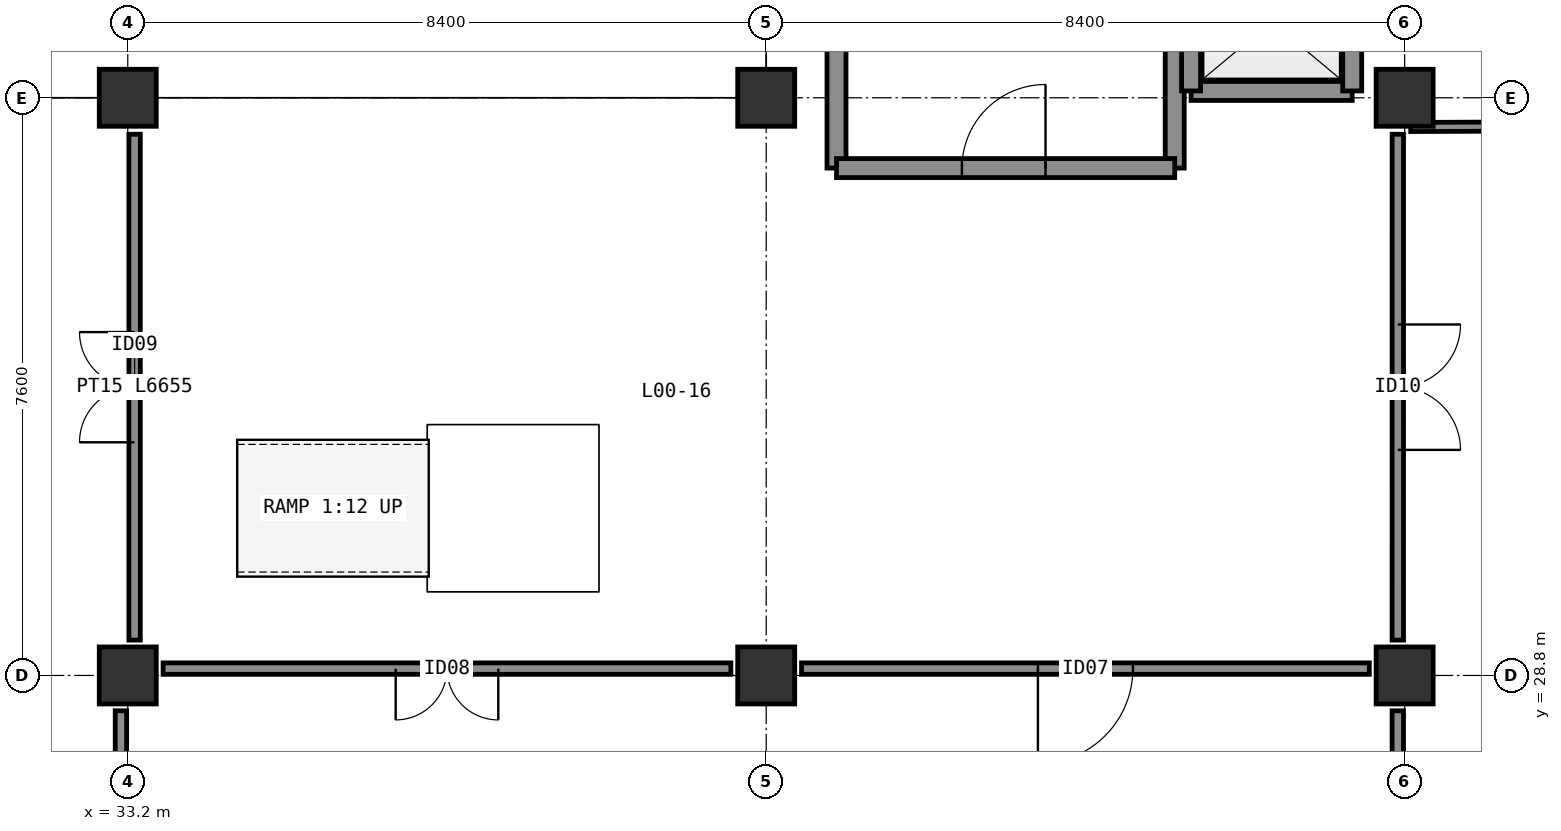
"""IFC4 building model, lengths in metres.
Left out: names, types, materials, properties, quantities, classifications, styles, units other than length and angle.
Written with IfcOpenShell. Run it as: python <this file> out.ifc"""

import sys

from ifc_helpers import new_model, si_unit, direction, frame, frame_2d, origin, origin_2d, place, context, subcontext, project, spatial, rectangle, extrude, element, fill, save


model = new_model("IFC4")
c1 = context("Model", 3, precision=1e-05, world=origin(), true_north=direction((0.0, 1.0)))
c2 = subcontext(c1, "Body", "Model", "MODEL_VIEW")
j1 = project(units=[si_unit("LENGTHUNIT", "METRE"), si_unit("PLANEANGLEUNIT", "RADIAN")], contexts=[c1])
p1 = place(None, origin())
s1 = spatial("IfcSite", under=j1, at=p1, CompositionType="ELEMENT")
p2 = place(p1, origin())
s2 = spatial("IfcBuilding", under=s1, at=p2, CompositionType="ELEMENT")
p3 = place(p2, origin())
s3 = spatial("IfcBuildingStorey", under=s2, at=p3, CompositionType="ELEMENT", Elevation=0.0)
for number, where, z_axis, x_axis in (
    (1, (33.2, 28.8, 0.0), (0.0, 0.0, 1.0), (1.0, 0.0, 0.0)),
    (2, (41.6, 28.8, 0.0), (0.0, 0.0, 1.0), (1.0, 0.0, 0.0)),
    (3, (50.0, 28.8, 0.0), (0.0, 0.0, 1.0), (1.0, 0.0, 0.0)),
    (4, (33.2, 36.4, 0.0), (0.0, 0.0, 1.0), (1.0, 0.0, 0.0)),
    (5, (41.6, 36.4, 0.0), (0.0, 0.0, 1.0), (1.0, 0.0, 0.0)),
    (6, (50.0, 36.4, 0.0), (0.0, 0.0, 1.0), (1.0, 0.0, 0.0)),
):
    element("IfcColumn", number, at=place(p3, frame(where, z_axis=z_axis, x_axis=x_axis)), inside=s3, PredefinedType="COLUMN", context=c2, shape_type="SweptSolid", body=[
        extrude(rectangle(XDim=0.75, YDim=0.75, at=origin_2d()), origin(), (0.0, 0.0, 1.0), 4.8),
    ])
for number, where, z_axis, x_axis in (
    (7, (42.525, 35.475, 0.0), (0.0, 0.0, 1.0), (0.0, 1.0, 0.0)),
    (8, (46.975, 35.475, 0.0), (0.0, 0.0, 1.0), (0.0, 1.0, 0.0)),
):
    element("IfcWall", number, at=place(p3, frame(where, z_axis=z_axis, x_axis=x_axis)), inside=s3, PredefinedType="SHEAR", context=c2, shape_type="SweptSolid", body=[
        extrude(rectangle(XDim=8.1, YDim=0.25, at=frame_2d((4.05, 0.0))), origin(), (0.0, 0.0, 1.0), 4.52),
    ])
p4 = place(p3, frame((42.525, 35.475, 0.0), z_axis=(0.0, 0.0, 1.0), x_axis=(1.0, 0.0, 0.0)))
e9 = element("IfcWall", 9, at=p4, inside=s3, PredefinedType="SHEAR", context=c2, shape_type="SweptSolid", body=[
    extrude(rectangle(XDim=4.45, YDim=0.25, at=frame_2d((2.225, 0.0))), origin(), (0.0, 0.0, 1.0), 4.52),
])
p5 = place(p4, frame((1.65, 0.0, 0.0)))
e10 = element("IfcOpeningElement", 10, at=p5, cuts=e9, PredefinedType="OPENING", context=c2, shape_type="SweptSolid", body=[
    extrude(rectangle(XDim=1.1, YDim=2.1, at=frame_2d((0.55, 1.05))), frame((0.0, 0.135, 0.0), z_axis=(0.0, -1.0, 0.0), x_axis=(1.0, 0.0, 0.0)), (0.0, 0.0, 1.0), 0.27),
])
p6 = place(p3, frame((47.19, 36.49, 0.0), z_axis=(0.0, 0.0, 1.0), x_axis=(1.0, 0.0, 0.0)))
e11 = element("IfcWall", 11, at=p6, inside=s3, PredefinedType="SHEAR", context=c2, shape_type="SweptSolid", body=[
    extrude(rectangle(XDim=2.12, YDim=0.25, at=frame_2d((1.06, 0.0))), origin(), (0.0, 0.0, 1.0), 4.52),
])
for number, where, z_axis, x_axis in (
    (12, (47.19, 36.49, 0.0), (0.0, 0.0, 1.0), (0.0, 1.0, 0.0)),
    (13, (49.31, 36.49, 0.0), (0.0, 0.0, 1.0), (0.0, 1.0, 0.0)),
):
    element("IfcWall", number, at=place(p3, frame(where, z_axis=z_axis, x_axis=x_axis)), inside=s3, PredefinedType="SHEAR", context=c2, shape_type="SweptSolid", body=[
        extrude(rectangle(XDim=1.82, YDim=0.25, at=frame_2d((0.91, 0.0))), origin(), (0.0, 0.0, 1.0), 4.52),
    ])
p7 = place(p3, frame((66.26, 36.09, 0.0), z_axis=(0.0, 0.0, 1.0), x_axis=(-0.999989479484, -0.004587038489, 0.0)))
e14 = element("IfcWall", 14, at=p7, inside=s3, PredefinedType="PARTITIONING", context=c2, shape_type="SweptSolid", body=[
    extrude(rectangle(XDim=16.18, YDim=0.12, at=frame_2d((8.09, 0.0))), origin(), (0.0, 0.0, 1.0), 4.5),
])
p8 = place(p7, frame((8.815, 0.0, 0.0)))
e15 = element("IfcOpeningElement", 15, at=p8, cuts=e14, PredefinedType="OPENING", context=c2, shape_type="SweptSolid", body=[
    extrude(rectangle(XDim=1.15, YDim=2.12, at=frame_2d((0.575, 1.06))), frame((0.0, 0.07, 0.0), z_axis=(0.0, -1.0, 0.0), x_axis=(1.0, 0.0, 0.0)), (0.0, 0.0, 1.0), 0.14),
])
p9 = place(p3, frame((33.29, 29.265, 0.0), z_axis=(0.0, 0.0, 1.0), x_axis=(0.0, 1.0, 0.0)))
e16 = element("IfcWall", 16, at=p9, inside=s3, PredefinedType="PARTITIONING", context=c2, shape_type="SweptSolid", body=[
    extrude(rectangle(XDim=6.655, YDim=0.15, at=frame_2d((3.328, 0.0))), origin(), (0.0, 0.0, 1.0), 4.5),
])
p10 = place(p9, frame((2.603, 0.0, 0.0)))
e17 = element("IfcOpeningElement", 17, at=p10, cuts=e16, PredefinedType="OPENING", context=c2, shape_type="SweptSolid", body=[
    extrude(rectangle(XDim=1.45, YDim=2.18, at=frame_2d((0.725, 1.09))), frame((0.0, 0.085, 0.0), z_axis=(0.0, -1.0, 0.0), x_axis=(1.0, 0.0, 0.0)), (0.0, 0.0, 1.0), 0.17),
])
p11 = place(p3, frame((49.91, 35.92, 0.0), z_axis=(0.0, 0.0, 1.0), x_axis=(-7.3370263e-05, -0.999999997308, 0.0)))
e18 = element("IfcWall", 18, at=p11, inside=s3, PredefinedType="PARTITIONING", context=c2, shape_type="SweptSolid", body=[
    extrude(rectangle(XDim=6.655, YDim=0.15, at=frame_2d((3.328, 0.0))), origin(), (0.0, 0.0, 1.0), 3.81),
])
p12 = place(p11, frame((2.502, 0.0, 0.0)))
e19 = element("IfcOpeningElement", 19, at=p12, cuts=e18, PredefinedType="OPENING", context=c2, shape_type="SweptSolid", body=[
    extrude(rectangle(XDim=1.65, YDim=2.18, at=frame_2d((0.825, 1.09))), frame((0.0, 0.085, 0.0), z_axis=(0.0, -1.0, 0.0), x_axis=(1.0, 0.0, 0.0)), (0.0, 0.0, 1.0), 0.17),
])
p13 = place(p3, frame((33.11, 28.335, 0.0), z_axis=(0.0, 0.0, 1.0), x_axis=(0.0, -1.0, 0.0)))
e20 = element("IfcWall", 20, at=p13, inside=s3, PredefinedType="PARTITIONING", context=c2, shape_type="SweptSolid", body=[
    extrude(rectangle(XDim=6.67, YDim=0.15, at=frame_2d((3.335, 0.0))), origin(), (0.0, 0.0, 1.0), 3.81),
])
p14 = place(p13, frame((2.41, 0.0, 0.0)))
e21 = element("IfcOpeningElement", 21, at=p14, cuts=e20, PredefinedType="OPENING", context=c2, shape_type="SweptSolid", body=[
    extrude(rectangle(XDim=1.85, YDim=2.22, at=frame_2d((0.925, 1.11))), frame((0.0, 0.085, 0.0), z_axis=(0.0, -1.0, 0.0), x_axis=(1.0, 0.0, 0.0)), (0.0, 0.0, 1.0), 0.17),
])
p15 = place(p3, frame((49.91, 28.335, 0.0), z_axis=(0.0, 0.0, 1.0), x_axis=(0.0, -1.0, 0.0)))
e22 = element("IfcWall", 22, at=p15, inside=s3, PredefinedType="PARTITIONING", context=c2, shape_type="SweptSolid", body=[
    extrude(rectangle(XDim=6.67, YDim=0.15, at=frame_2d((3.335, 0.0))), origin(), (0.0, 0.0, 1.0), 4.5),
])
p16 = place(p15, frame((2.845, 0.0, 0.0)))
e23 = element("IfcOpeningElement", 23, at=p16, cuts=e22, PredefinedType="OPENING", context=c2, shape_type="SweptSolid", body=[
    extrude(rectangle(XDim=0.98, YDim=2.08, at=frame_2d((0.49, 1.04))), frame((0.0, 0.085, 0.0), z_axis=(0.0, -1.0, 0.0), x_axis=(1.0, 0.0, 0.0)), (0.0, 0.0, 1.0), 0.17),
])
p17 = place(p3, frame((49.535, 28.89, 0.0), z_axis=(0.0, 0.0, 1.0), x_axis=(-1.0, 0.0, 0.0)))
e24 = element("IfcWall", 24, at=p17, inside=s3, PredefinedType="PARTITIONING", context=c2, shape_type="SweptSolid", body=[
    extrude(rectangle(XDim=7.47, YDim=0.15, at=frame_2d((3.735, 0.0))), origin(), (0.0, 0.0, 1.0), 3.81),
])
p18 = place(p17, frame((3.11, 0.0, 0.0)))
e25 = element("IfcOpeningElement", 25, at=p18, cuts=e24, PredefinedType="OPENING", context=c2, shape_type="SweptSolid", body=[
    extrude(rectangle(XDim=1.25, YDim=2.12, at=frame_2d((0.625, 1.06))), frame((0.0, 0.085, 0.0), z_axis=(0.0, -1.0, 0.0), x_axis=(1.0, 0.0, 0.0)), (0.0, 0.0, 1.0), 0.17),
])
p19 = place(p3, frame((41.135, 28.89, 0.0), z_axis=(0.0, 0.0, 1.0), x_axis=(-1.0, 0.0, 0.0)))
e26 = element("IfcWall", 26, at=p19, inside=s3, PredefinedType="PARTITIONING", context=c2, shape_type="SweptSolid", body=[
    extrude(rectangle(XDim=7.47, YDim=0.15, at=frame_2d((3.735, 0.0))), origin(), (0.0, 0.0, 1.0), 4.047),
])
p20 = place(p19, frame((3.06, 0.0, 0.0)))
e27 = element("IfcOpeningElement", 27, at=p20, cuts=e26, PredefinedType="OPENING", context=c2, shape_type="SweptSolid", body=[
    extrude(rectangle(XDim=1.35, YDim=2.18, at=frame_2d((0.675, 1.09))), frame((0.0, 0.085, 0.0), z_axis=(0.0, -1.0, 0.0), x_axis=(1.0, 0.0, 0.0)), (0.0, 0.0, 1.0), 0.17),
])
p21 = place(p5, frame((1.1, 0.0, 0.0), z_axis=(0.0, 0.0, 1.0), x_axis=(-1.0, 0.0, 0.0)))
e28 = element("IfcDoor", 28, at=p21, inside=s3, OperationType="SINGLE_SWING_RIGHT", PredefinedType="DOOR", context=c2, shape_type="SweptSolid", body=[
    extrude(rectangle(XDim=1.1, YDim=2.1, at=frame_2d((0.55, 1.05))), frame((0.0, 0.025, 0.0), z_axis=(0.0, -1.0, 0.0), x_axis=(1.0, 0.0, 0.0)), (0.0, 0.0, 1.0), 0.05),
])
fill(e10, e28)
p22 = place(p10, origin())
e29 = element("IfcDoor", 29, at=p22, inside=s3, OperationType="DOUBLE_DOOR_SINGLE_SWING", PredefinedType="DOOR", context=c2, shape_type="SweptSolid", body=[
    extrude(rectangle(XDim=1.45, YDim=2.18, at=frame_2d((0.725, 1.09))), frame((0.0, 0.025, 0.0), z_axis=(0.0, -1.0, 0.0), x_axis=(1.0, 0.0, 0.0)), (0.0, 0.0, 1.0), 0.05),
])
fill(e17, e29)
p23 = place(p12, origin())
e30 = element("IfcDoor", 30, at=p23, inside=s3, OperationType="DOUBLE_DOOR_SINGLE_SWING", PredefinedType="DOOR", context=c2, shape_type="SweptSolid", body=[
    extrude(rectangle(XDim=1.65, YDim=2.18, at=frame_2d((0.825, 1.09))), frame((0.0, 0.025, 0.0), z_axis=(0.0, -1.0, 0.0), x_axis=(1.0, 0.0, 0.0)), (0.0, 0.0, 1.0), 0.05),
])
fill(e19, e30)
p24 = place(p18, origin())
e31 = element("IfcDoor", 31, at=p24, inside=s3, OperationType="SINGLE_SWING_RIGHT", PredefinedType="DOOR", context=c2, shape_type="SweptSolid", body=[
    extrude(rectangle(XDim=1.25, YDim=2.12, at=frame_2d((0.625, 1.06))), frame((0.0, 0.025, 0.0), z_axis=(0.0, -1.0, 0.0), x_axis=(1.0, 0.0, 0.0)), (0.0, 0.0, 1.0), 0.05),
])
fill(e25, e31)
p25 = place(p20, origin())
e32 = element("IfcDoor", 32, at=p25, inside=s3, OperationType="DOUBLE_DOOR_SINGLE_SWING", PredefinedType="DOOR", context=c2, shape_type="SweptSolid", body=[
    extrude(rectangle(XDim=1.35, YDim=2.18, at=frame_2d((0.675, 1.09))), frame((0.0, 0.025, 0.0), z_axis=(0.0, -1.0, 0.0), x_axis=(1.0, 0.0, 0.0)), (0.0, 0.0, 1.0), 0.05),
])
fill(e27, e32)
save(model, sys.argv[1])
